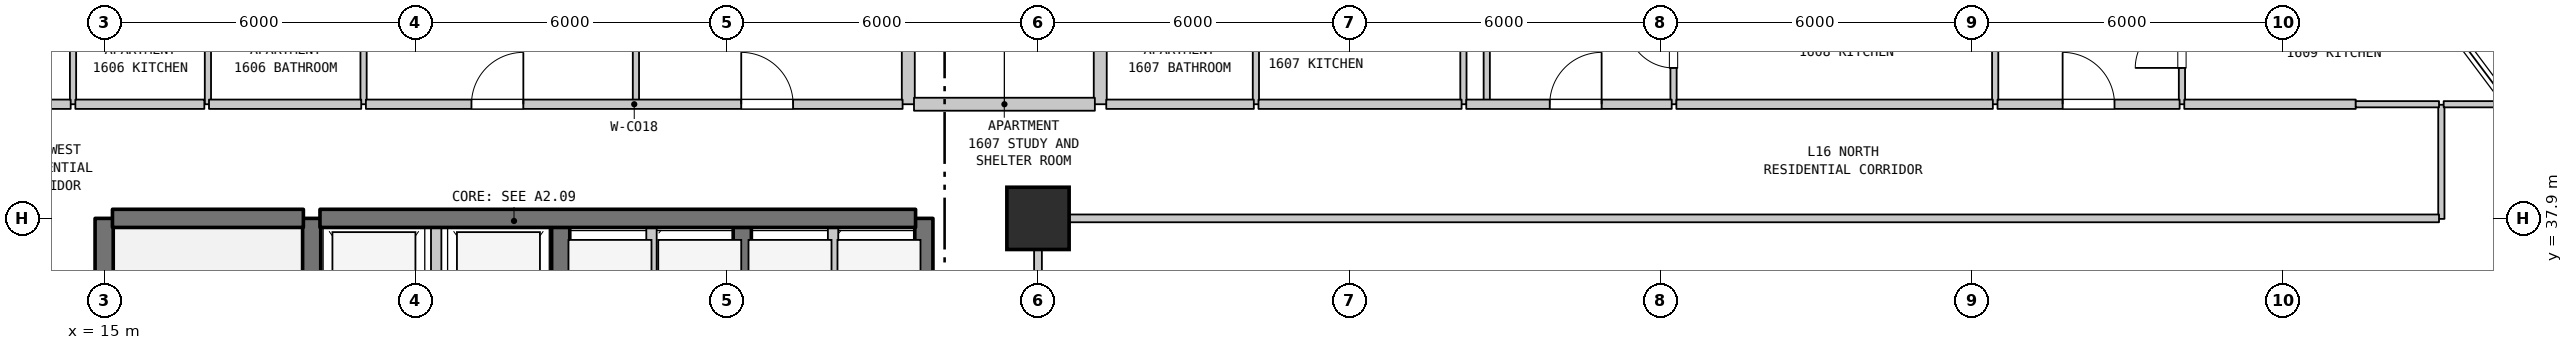
"""IFC4 building model, lengths in metres.
Left out: names, types, materials, properties, quantities, classifications, styles, units other than length and angle.
Written with IfcOpenShell. Run it as: python <this file> out.ifc"""

import sys

from ifc_helpers import new_model, si_unit, direction, frame, frame_2d, origin, origin_2d, place, context, subcontext, project, spatial, rectangle, extrude, element, fill, save


model = new_model("IFC4")
c1 = context("Model", 3, precision=1e-05, world=origin(), true_north=direction((0.0, 1.0)))
c2 = subcontext(c1, "Body", "Model", "MODEL_VIEW")
j1 = project(units=[si_unit("LENGTHUNIT", "METRE"), si_unit("PLANEANGLEUNIT", "RADIAN")], contexts=[c1])
p1 = place(None, origin())
s1 = spatial("IfcSite", under=j1, at=p1, CompositionType="ELEMENT")
p2 = place(p1, origin())
s2 = spatial("IfcBuilding", under=s1, at=p2, CompositionType="ELEMENT")
p3 = place(p2, frame((0.0, 0.0, 70.1)))
s3 = spatial("IfcBuildingStorey", under=s2, at=p3, CompositionType="ELEMENT", Elevation=70.1)
p4 = place(p3, frame((33.0, 37.9, 0.0), z_axis=(0.0, 0.0, 1.0), x_axis=(1.0, 0.0, 0.0)))
e1 = element("IfcColumn", 1, at=p4, inside=s3, PredefinedType="COLUMN", context=c2, shape_type="SweptSolid", body=[
    extrude(rectangle(XDim=1.2, YDim=1.2, at=origin_2d()), origin(), (0.0, 0.0, 1.0), 3.7),
])
p5 = place(p3, frame((14.4, 40.1, 0.0), z_axis=(0.0, 0.0, 1.0), x_axis=(0.0, 1.0, 0.0)))
e2 = element("IfcWall", 2, at=p5, inside=s3, PredefinedType="PARTITIONING", context=c2, shape_type="SweptSolid", body=[
    extrude(rectangle(XDim=2.3, YDim=0.12, at=frame_2d((1.15, 0.0))), origin(), (0.0, 0.0, 1.0), 3.385),
])
p6 = place(p3, frame((15.0, 31.1, 0.0), z_axis=(0.0, 0.0, 1.0), x_axis=(0.0, 1.0, 0.0)))
e3 = element("IfcWall", 3, at=p6, inside=s3, PredefinedType="SHEAR", context=c2, shape_type="SweptSolid", body=[
    extrude(rectangle(XDim=6.8, YDim=0.35, at=frame_2d((3.4, 0.0))), origin(), (0.0, 0.0, 1.0), 3.385),
])
p7 = place(p3, frame((17.0, 40.1, 0.0), z_axis=(0.0, 0.0, 1.0), x_axis=(0.0, 1.0, 0.0)))
e4 = element("IfcWall", 4, at=p7, inside=s3, PredefinedType="PARTITIONING", context=c2, shape_type="SweptSolid", body=[
    extrude(rectangle(XDim=2.3, YDim=0.12, at=frame_2d((1.15, 0.0))), origin(), (0.0, 0.0, 1.0), 3.385),
])
p8 = place(p3, frame((19.0, 35.0, 0.0), z_axis=(0.0, 0.0, 1.0), x_axis=(0.0, 1.0, 0.0)))
e5 = element("IfcWall", 5, at=p8, inside=s3, PredefinedType="SHEAR", context=c2, shape_type="SweptSolid", body=[
    extrude(rectangle(XDim=2.9, YDim=0.35, at=frame_2d((1.45, 0.0))), origin(), (0.0, 0.0, 1.0), 3.385),
])
p9 = place(p3, frame((20.0, 40.1, 0.0), z_axis=(0.0, 0.0, 1.0), x_axis=(0.0, 1.0, 0.0)))
e6 = element("IfcWall", 6, at=p9, inside=s3, PredefinedType="PARTITIONING", context=c2, shape_type="SweptSolid", body=[
    extrude(rectangle(XDim=2.3, YDim=0.12, at=frame_2d((1.15, 0.0))), origin(), (0.0, 0.0, 1.0), 3.385),
])
p10 = place(p3, frame((21.4, 35.0, 0.0), z_axis=(0.0, 0.0, 1.0), x_axis=(0.0, 1.0, 0.0)))
e7 = element("IfcWall", 7, at=p10, inside=s3, PredefinedType="STANDARD", context=c2, shape_type="SweptSolid", body=[
    extrude(rectangle(XDim=2.9, YDim=0.2, at=frame_2d((1.45, 0.0))), origin(), (0.0, 0.0, 1.0), 3.385),
])
p11 = place(p3, frame((23.8, 35.0, 0.0), z_axis=(0.0, 0.0, 1.0), x_axis=(0.0, 1.0, 0.0)))
e8 = element("IfcWall", 8, at=p11, inside=s3, PredefinedType="SHEAR", context=c2, shape_type="SweptSolid", body=[
    extrude(rectangle(XDim=2.9, YDim=0.35, at=frame_2d((1.45, 0.0))), origin(), (0.0, 0.0, 1.0), 3.385),
])
p12 = place(p3, frame((25.25, 40.1, 0.0), z_axis=(0.0, 0.0, 1.0), x_axis=(0.0, 1.0, 0.0)))
e9 = element("IfcWall", 9, at=p12, inside=s3, PredefinedType="PARTITIONING", context=c2, shape_type="SweptSolid", body=[
    extrude(rectangle(XDim=2.05, YDim=0.12, at=frame_2d((1.025, 0.0))), origin(), (0.0, 0.0, 1.0), 3.385),
])
p13 = place(p3, frame((25.55, 35.0, 0.0), z_axis=(0.0, 0.0, 1.0), x_axis=(0.0, 1.0, 0.0)))
e10 = element("IfcWall", 10, at=p13, inside=s3, PredefinedType="STANDARD", context=c2, shape_type="SweptSolid", body=[
    extrude(rectangle(XDim=2.9, YDim=0.2, at=frame_2d((1.45, 0.0))), origin(), (0.0, 0.0, 1.0), 3.385),
])
p14 = place(p3, frame((27.3, 35.0, 0.0), z_axis=(0.0, 0.0, 1.0), x_axis=(0.0, 1.0, 0.0)))
e11 = element("IfcWall", 11, at=p14, inside=s3, PredefinedType="SHEAR", context=c2, shape_type="SweptSolid", body=[
    extrude(rectangle(XDim=2.9, YDim=0.35, at=frame_2d((1.45, 0.0))), origin(), (0.0, 0.0, 1.0), 3.385),
])
p15 = place(p3, frame((29.05, 35.0, 0.0), z_axis=(0.0, 0.0, 1.0), x_axis=(0.0, 1.0, 0.0)))
e12 = element("IfcWall", 12, at=p15, inside=s3, PredefinedType="STANDARD", context=c2, shape_type="SweptSolid", body=[
    extrude(rectangle(XDim=2.9, YDim=0.2, at=frame_2d((1.45, 0.0))), origin(), (0.0, 0.0, 1.0), 3.385),
])
p16 = place(p3, frame((30.5, 40.1, 0.0), z_axis=(0.0, 0.0, 1.0), x_axis=(0.0, 1.0, 0.0)))
e13 = element("IfcWall", 13, at=p16, inside=s3, PredefinedType="STANDARD", context=c2, shape_type="SweptSolid", body=[
    extrude(rectangle(XDim=2.3, YDim=0.25, at=frame_2d((1.15, 0.0))), origin(), (0.0, 0.0, 1.0), 3.385),
])
p17 = place(p3, frame((30.8, 35.0, 0.0), z_axis=(0.0, 0.0, 1.0), x_axis=(0.0, 1.0, 0.0)))
e14 = element("IfcWall", 14, at=p17, inside=s3, PredefinedType="SHEAR", context=c2, shape_type="SweptSolid", body=[
    extrude(rectangle(XDim=2.9, YDim=0.35, at=frame_2d((1.45, 0.0))), origin(), (0.0, 0.0, 1.0), 3.385),
])
p18 = place(p3, frame((33.0, 27.91, 0.0), z_axis=(0.0, 0.0, 1.0), x_axis=(0.0, 1.0, 0.0)))
e15 = element("IfcWall", 15, at=p18, inside=s3, PredefinedType="STANDARD", context=c2, shape_type="SweptSolid", body=[
    extrude(rectangle(XDim=9.98, YDim=0.15, at=frame_2d((4.99, 0.0))), origin(), (0.0, 0.0, 1.0), 2.885),
])
p19 = place(p3, frame((34.2, 40.1, 0.0), z_axis=(0.0, 0.0, 1.0), x_axis=(0.0, 1.0, 0.0)))
e16 = element("IfcWall", 16, at=p19, inside=s3, PredefinedType="STANDARD", context=c2, shape_type="SweptSolid", body=[
    extrude(rectangle(XDim=2.3, YDim=0.25, at=frame_2d((1.15, 0.0))), origin(), (0.0, 0.0, 1.0), 3.385),
])
for number, where, z_axis, x_axis in (
    (17, (37.2, 40.1, 0.0), (0.0, 0.0, 1.0), (0.0, 1.0, 0.0)),
    (18, (41.2, 40.1, 0.0), (0.0, 0.0, 1.0), (0.0, 1.0, 0.0)),
):
    element("IfcWall", number, at=place(p3, frame(where, z_axis=z_axis, x_axis=x_axis)), inside=s3, PredefinedType="PARTITIONING", context=c2, shape_type="SweptSolid", body=[
        extrude(rectangle(XDim=2.3, YDim=0.12, at=frame_2d((1.15, 0.0))), origin(), (0.0, 0.0, 1.0), 3.385),
    ])
p20 = place(p3, frame((41.65, 40.1, 0.0), z_axis=(0.0, 0.0, 1.0), x_axis=(0.0, 1.0, 0.0)))
e19 = element("IfcWall", 19, at=p20, inside=s3, PredefinedType="PARTITIONING", context=c2, shape_type="SweptSolid", body=[
    extrude(rectangle(XDim=13.79, YDim=0.12, at=frame_2d((6.895, 0.0))), origin(), (0.0, 0.0, 1.0), 3.385),
])
p21 = place(p3, frame((45.25, 40.1, 0.0), z_axis=(0.0, 0.0, 1.0), x_axis=(0.0, 1.0, 0.0)))
e20 = element("IfcWall", 20, at=p21, inside=s3, PredefinedType="PARTITIONING", context=c2, shape_type="SweptSolid", body=[
    extrude(rectangle(XDim=2.3, YDim=0.12, at=frame_2d((1.15, 0.0))), origin(), (0.0, 0.0, 1.0), 3.385),
])
p22 = place(p21, frame((0.7, 0.0, 0.0)))
e21 = element("IfcOpeningElement", 21, at=p22, cuts=e20, PredefinedType="OPENING", context=c2, shape_type="SweptSolid", body=[
    extrude(rectangle(XDim=0.9, YDim=2.15, at=frame_2d((0.45, 1.075))), frame((0.0, 0.07, 0.0), z_axis=(0.0, -1.0, 0.0), x_axis=(1.0, 0.0, 0.0)), (0.0, 0.0, 1.0), 0.14),
])
p23 = place(p3, frame((51.45, 40.1, 0.0), z_axis=(0.0, 0.0, 1.0), x_axis=(0.0, 1.0, 0.0)))
e22 = element("IfcWall", 22, at=p23, inside=s3, PredefinedType="PARTITIONING", context=c2, shape_type="SweptSolid", body=[
    extrude(rectangle(XDim=2.3, YDim=0.12, at=frame_2d((1.15, 0.0))), origin(), (0.0, 0.0, 1.0), 3.385),
])
p24 = place(p3, frame((55.05, 40.1, 0.0), z_axis=(0.0, 0.0, 1.0), x_axis=(0.0, 1.0, 0.0)))
e23 = element("IfcWall", 23, at=p24, inside=s3, PredefinedType="PARTITIONING", context=c2, shape_type="SweptSolid", body=[
    extrude(rectangle(XDim=2.3, YDim=0.12, at=frame_2d((1.15, 0.0))), origin(), (0.0, 0.0, 1.0), 3.385),
])
p25 = place(p24, frame((0.7, 0.0, 0.0)))
e24 = element("IfcOpeningElement", 24, at=p25, cuts=e23, PredefinedType="OPENING", context=c2, shape_type="SweptSolid", body=[
    extrude(rectangle(XDim=0.9, YDim=2.15, at=frame_2d((0.45, 1.075))), frame((0.0, 0.07, 0.0), z_axis=(0.0, -1.0, 0.0), x_axis=(1.0, 0.0, 0.0)), (0.0, 0.0, 1.0), 0.14),
])
p26 = place(p3, frame((60.05, 37.89, 0.0), z_axis=(0.0, 0.0, 1.0), x_axis=(0.0, 1.0, 0.0)))
e25 = element("IfcWall", 25, at=p26, inside=s3, PredefinedType="PARTITIONING", context=c2, shape_type="SweptSolid", body=[
    extrude(rectangle(XDim=2.2, YDim=0.12, at=frame_2d((1.1, 0.0))), origin(), (0.0, 0.0, 1.0), 3.385),
])
p27 = place(p3, frame((15.16, 37.9, 0.0), z_axis=(0.0, 0.0, 1.0), x_axis=(1.0, 0.0, 0.0)))
e26 = element("IfcWall", 26, at=p27, inside=s3, PredefinedType="SHEAR", context=c2, shape_type="SweptSolid", body=[
    extrude(rectangle(XDim=3.68, YDim=0.35, at=frame_2d((1.84, 0.0))), origin(), (0.0, 0.0, 1.0), 3.385),
])
p28 = place(p3, frame((19.16, 37.9, 0.0), z_axis=(0.0, 0.0, 1.0), x_axis=(1.0, 0.0, 0.0)))
e27 = element("IfcWall", 27, at=p28, inside=s3, PredefinedType="SHEAR", context=c2, shape_type="SweptSolid", body=[
    extrude(rectangle(XDim=11.48, YDim=0.35, at=frame_2d((5.74, 0.0))), origin(), (0.0, 0.0, 1.0), 3.385),
])
p29 = place(p3, frame((33.07, 37.9, 0.0), z_axis=(0.0, 0.0, 1.0), x_axis=(1.0, 0.0, 0.0)))
e28 = element("IfcWall", 28, at=p29, inside=s3, PredefinedType="STANDARD", context=c2, shape_type="SweptSolid", body=[
    extrude(rectangle(XDim=26.935, YDim=0.15, at=frame_2d((13.467, 0.0))), origin(), (0.0, 0.0, 1.0), 3.385),
])
p30 = place(p3, frame((12.875, 40.1, 0.0), z_axis=(0.0, 0.0, 1.0), x_axis=(1.0, 0.0, 0.0)))
e29 = element("IfcWall", 29, at=p30, inside=s3, PredefinedType="STANDARD", context=c2, shape_type="SweptSolid", body=[
    extrude(rectangle(XDim=1.48, YDim=0.18, at=frame_2d((0.74, 0.0))), origin(), (0.0, 0.0, 1.0), 3.385),
])
p31 = place(p3, frame((14.445, 40.1, 0.0), z_axis=(0.0, 0.0, 1.0), x_axis=(1.0, 0.0, 0.0)))
e30 = element("IfcWall", 30, at=p31, inside=s3, PredefinedType="STANDARD", context=c2, shape_type="SweptSolid", body=[
    extrude(rectangle(XDim=2.486, YDim=0.18, at=frame_2d((1.243, 0.0))), origin(), (0.0, 0.0, 1.0), 3.385),
])
p32 = place(p3, frame((17.021, 40.1, 0.0), z_axis=(0.0, 0.0, 1.0), x_axis=(1.0, 0.0, 0.0)))
e31 = element("IfcWall", 31, at=p32, inside=s3, PredefinedType="STANDARD", context=c2, shape_type="SweptSolid", body=[
    extrude(rectangle(XDim=2.934, YDim=0.18, at=frame_2d((1.467, 0.0))), origin(), (0.0, 0.0, 1.0), 3.385),
])
p33 = place(p3, frame((20.045, 40.1, 0.0), z_axis=(0.0, 0.0, 1.0), x_axis=(1.0, 0.0, 0.0)))
e32 = element("IfcWall", 32, at=p33, inside=s3, PredefinedType="STANDARD", context=c2, shape_type="SweptSolid", body=[
    extrude(rectangle(XDim=10.345, YDim=0.18, at=frame_2d((5.172, 0.0))), origin(), (0.0, 0.0, 1.0), 3.385),
])
p34 = place(p33, frame((2.035, 0.0, 0.0)))
e33 = element("IfcOpeningElement", 33, at=p34, cuts=e32, PredefinedType="OPENING", context=c2, shape_type="SweptSolid", body=[
    extrude(rectangle(XDim=1.0, YDim=2.15, at=frame_2d((0.5, 1.075))), frame((0.0, 0.1, 0.0), z_axis=(0.0, -1.0, 0.0), x_axis=(1.0, 0.0, 0.0)), (0.0, 0.0, 1.0), 0.2),
])
p35 = place(p33, frame((7.235, 0.0, 0.0)))
e34 = element("IfcOpeningElement", 34, at=p35, cuts=e32, PredefinedType="OPENING", context=c2, shape_type="SweptSolid", body=[
    extrude(rectangle(XDim=1.0, YDim=2.15, at=frame_2d((0.5, 1.075))), frame((0.0, 0.1, 0.0), z_axis=(0.0, -1.0, 0.0), x_axis=(1.0, 0.0, 0.0)), (0.0, 0.0, 1.0), 0.2),
])
p36 = place(p3, frame((30.61, 40.1, 0.0), z_axis=(0.0, 0.0, 1.0), x_axis=(1.0, 0.0, 0.0)))
e35 = element("IfcWall", 35, at=p36, inside=s3, PredefinedType="STANDARD", context=c2, shape_type="SweptSolid", body=[
    extrude(rectangle(XDim=3.486, YDim=0.25, at=frame_2d((1.743, 0.0))), origin(), (0.0, 0.0, 1.0), 3.385),
])
p37 = place(p3, frame((34.316, 40.1, 0.0), z_axis=(0.0, 0.0, 1.0), x_axis=(1.0, 0.0, 0.0)))
e36 = element("IfcWall", 36, at=p37, inside=s3, PredefinedType="STANDARD", context=c2, shape_type="SweptSolid", body=[
    extrude(rectangle(XDim=2.844, YDim=0.18, at=frame_2d((1.422, 0.0))), origin(), (0.0, 0.0, 1.0), 3.385),
])
p38 = place(p3, frame((37.25, 40.1, 0.0), z_axis=(0.0, 0.0, 1.0), x_axis=(1.0, 0.0, 0.0)))
e37 = element("IfcWall", 37, at=p38, inside=s3, PredefinedType="STANDARD", context=c2, shape_type="SweptSolid", body=[
    extrude(rectangle(XDim=3.915, YDim=0.18, at=frame_2d((1.958, 0.0))), origin(), (0.0, 0.0, 1.0), 3.385),
])
p39 = place(p3, frame((41.255, 40.1, 0.0), z_axis=(0.0, 0.0, 1.0), x_axis=(1.0, 0.0, 0.0)))
e38 = element("IfcWall", 38, at=p39, inside=s3, PredefinedType="STANDARD", context=c2, shape_type="SweptSolid", body=[
    extrude(rectangle(XDim=3.96, YDim=0.18, at=frame_2d((1.98, 0.0))), origin(), (0.0, 0.0, 1.0), 3.385),
])
p40 = place(p39, frame((1.609, 0.0, 0.0)))
e39 = element("IfcOpeningElement", 39, at=p40, cuts=e38, PredefinedType="OPENING", context=c2, shape_type="SweptSolid", body=[
    extrude(rectangle(XDim=1.0, YDim=2.15, at=frame_2d((0.5, 1.075))), frame((0.0, 0.1, 0.0), z_axis=(0.0, -1.0, 0.0), x_axis=(1.0, 0.0, 0.0)), (0.0, 0.0, 1.0), 0.2),
])
p41 = place(p3, frame((45.305, 40.1, 0.0), z_axis=(0.0, 0.0, 1.0), x_axis=(1.0, 0.0, 0.0)))
e40 = element("IfcWall", 40, at=p41, inside=s3, PredefinedType="STANDARD", context=c2, shape_type="SweptSolid", body=[
    extrude(rectangle(XDim=6.1, YDim=0.18, at=frame_2d((3.05, 0.0))), origin(), (0.0, 0.0, 1.0), 3.385),
])
p42 = place(p3, frame((51.495, 40.1, 0.0), z_axis=(0.0, 0.0, 1.0), x_axis=(1.0, 0.0, 0.0)))
e41 = element("IfcWall", 41, at=p42, inside=s3, PredefinedType="STANDARD", context=c2, shape_type="SweptSolid", body=[
    extrude(rectangle(XDim=3.51, YDim=0.18, at=frame_2d((1.755, 0.0))), origin(), (0.0, 0.0, 1.0), 3.385),
])
p43 = place(p42, frame((1.255, 0.0, 0.0)))
e42 = element("IfcOpeningElement", 42, at=p43, cuts=e41, PredefinedType="OPENING", context=c2, shape_type="SweptSolid", body=[
    extrude(rectangle(XDim=1.0, YDim=2.15, at=frame_2d((0.5, 1.075))), frame((0.0, 0.1, 0.0), z_axis=(0.0, -1.0, 0.0), x_axis=(1.0, 0.0, 0.0)), (0.0, 0.0, 1.0), 0.2),
])
p44 = place(p3, frame((55.095, 40.1, 0.0), z_axis=(0.0, 0.0, 1.0), x_axis=(1.0, 0.0, 0.0)))
e43 = element("IfcWall", 43, at=p44, inside=s3, PredefinedType="STANDARD", context=c2, shape_type="SweptSolid", body=[
    extrude(rectangle(XDim=3.305, YDim=0.18, at=frame_2d((1.652, 0.0))), origin(), (0.0, 0.0, 1.0), 3.385),
])
p45 = place(p3, frame((58.4, 40.1, 0.0), z_axis=(0.0, 0.0, 1.0), x_axis=(1.0, 0.0, 0.0)))
e44 = element("IfcWall", 44, at=p45, inside=s3, PredefinedType="PARTITIONING", context=c2, shape_type="SweptSolid", body=[
    extrude(rectangle(XDim=1.605, YDim=0.12, at=frame_2d((0.802, 0.0))), origin(), (0.0, 0.0, 1.0), 3.385),
])
p46 = place(p3, frame((60.095, 40.1, 0.0), z_axis=(0.0, 0.0, 1.0), x_axis=(1.0, 0.0, 0.0)))
e45 = element("IfcWall", 45, at=p46, inside=s3, PredefinedType="PARTITIONING", context=c2, shape_type="SweptSolid", body=[
    extrude(rectangle(XDim=1.245, YDim=0.12, at=frame_2d((0.623, 0.0))), origin(), (0.0, 0.0, 1.0), 3.385),
])
p47 = place(p22, origin())
e46 = element("IfcDoor", 46, at=p47, inside=s3, OperationType="SINGLE_SWING_RIGHT", PredefinedType="DOOR", context=c2, shape_type="SweptSolid", body=[
    extrude(rectangle(XDim=0.9, YDim=2.15, at=frame_2d((0.45, 1.075))), frame((0.0, 0.025, 0.0), z_axis=(0.0, -1.0, 0.0), x_axis=(1.0, 0.0, 0.0)), (0.0, 0.0, 1.0), 0.05),
])
fill(e21, e46)
p48 = place(p25, origin())
e47 = element("IfcDoor", 47, at=p48, inside=s3, OperationType="SINGLE_SWING_LEFT", PredefinedType="DOOR", context=c2, shape_type="SweptSolid", body=[
    extrude(rectangle(XDim=0.9, YDim=2.15, at=frame_2d((0.45, 1.075))), frame((0.0, 0.025, 0.0), z_axis=(0.0, -1.0, 0.0), x_axis=(1.0, 0.0, 0.0)), (0.0, 0.0, 1.0), 0.05),
])
fill(e24, e47)
p49 = place(p34, origin())
e48 = element("IfcDoor", 48, at=p49, inside=s3, OperationType="SINGLE_SWING_RIGHT", PredefinedType="DOOR", context=c2, shape_type="SweptSolid", body=[
    extrude(rectangle(XDim=1.0, YDim=2.15, at=frame_2d((0.5, 1.075))), frame((0.0, 0.025, 0.0), z_axis=(0.0, -1.0, 0.0), x_axis=(1.0, 0.0, 0.0)), (0.0, 0.0, 1.0), 0.05),
])
fill(e33, e48)
p50 = place(p35, origin())
e49 = element("IfcDoor", 49, at=p50, inside=s3, OperationType="SINGLE_SWING_LEFT", PredefinedType="DOOR", context=c2, shape_type="SweptSolid", body=[
    extrude(rectangle(XDim=1.0, YDim=2.15, at=frame_2d((0.5, 1.075))), frame((0.0, 0.025, 0.0), z_axis=(0.0, -1.0, 0.0), x_axis=(1.0, 0.0, 0.0)), (0.0, 0.0, 1.0), 0.05),
])
fill(e34, e49)
p51 = place(p40, origin())
e50 = element("IfcDoor", 50, at=p51, inside=s3, OperationType="SINGLE_SWING_RIGHT", PredefinedType="DOOR", context=c2, shape_type="SweptSolid", body=[
    extrude(rectangle(XDim=1.0, YDim=2.15, at=frame_2d((0.5, 1.075))), frame((0.0, 0.025, 0.0), z_axis=(0.0, -1.0, 0.0), x_axis=(1.0, 0.0, 0.0)), (0.0, 0.0, 1.0), 0.05),
])
fill(e39, e50)
p52 = place(p43, origin())
e51 = element("IfcDoor", 51, at=p52, inside=s3, OperationType="SINGLE_SWING_LEFT", PredefinedType="DOOR", context=c2, shape_type="SweptSolid", body=[
    extrude(rectangle(XDim=1.0, YDim=2.15, at=frame_2d((0.5, 1.075))), frame((0.0, 0.025, 0.0), z_axis=(0.0, -1.0, 0.0), x_axis=(1.0, 0.0, 0.0)), (0.0, 0.0, 1.0), 0.05),
])
fill(e42, e51)
save(model, sys.argv[1])
